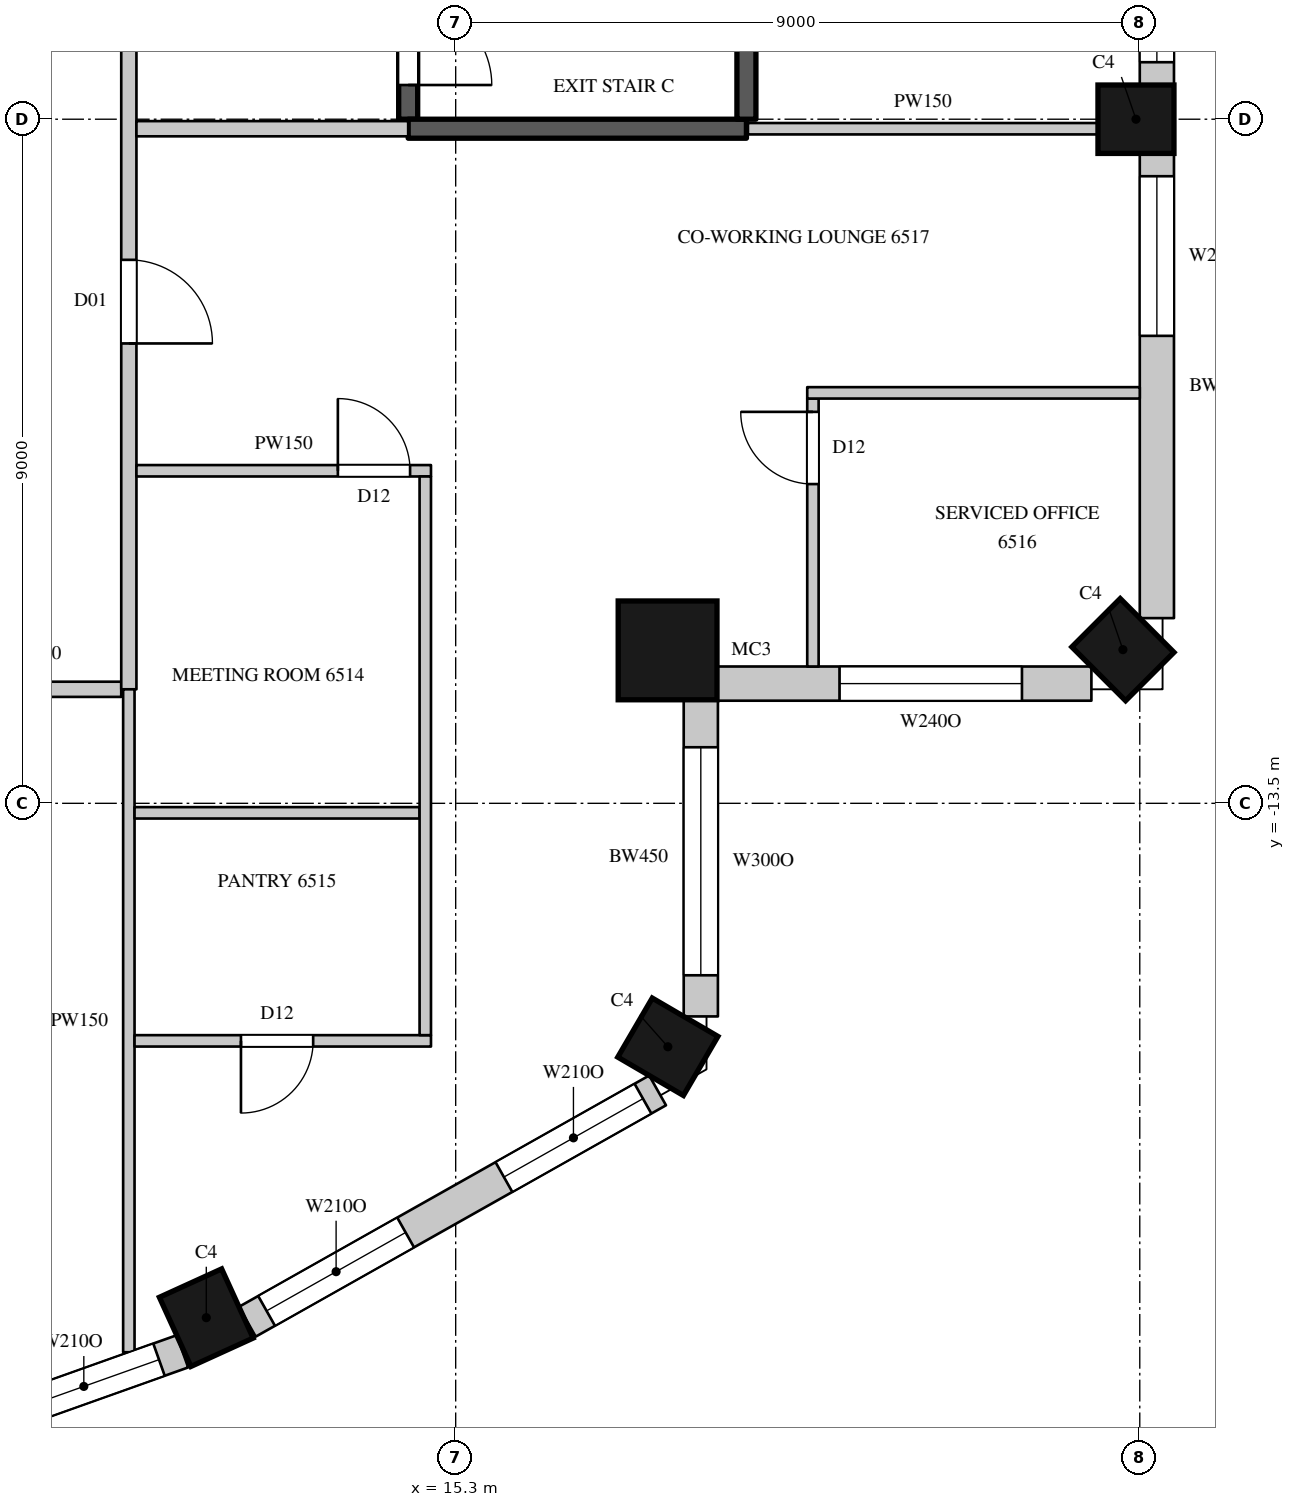
"""IFC4 building model, lengths in metres.
Left out: names, types, materials, properties, quantities, classifications, styles, units other than length and angle.
Written with IfcOpenShell. Run it as: python <this file> out.ifc"""

import sys

from ifc_helpers import new_model, si_unit, direction, frame, frame_2d, origin, origin_2d, place, context, subcontext, project, spatial, rectangle, circle, extrude, element, fill, save


model = new_model("IFC4")
c1 = context("Model", 3, precision=1e-05, world=origin(), true_north=direction((0.0, 1.0)))
c2 = subcontext(c1, "Body", "Model", "MODEL_VIEW")
j1 = project(units=[si_unit("LENGTHUNIT", "METRE"), si_unit("PLANEANGLEUNIT", "RADIAN")], contexts=[c1])
p1 = place(None, origin())
s1 = spatial("IfcSite", under=j1, at=p1, CompositionType="ELEMENT")
p2 = place(p1, origin())
s2 = spatial("IfcBuilding", under=s1, at=p2, CompositionType="ELEMENT")
p3 = place(p2, frame((0.0, 0.0, 288.5)))
s3 = spatial("IfcBuildingStorey", under=s2, at=p3, CompositionType="ELEMENT", Elevation=288.5)
for number, where, z_axis, x_axis in (
    (1, (12.019, -20.267, 0.0), (0.0, 0.0, 1.0), (0.91, 0.415, 0.0)),
    (2, (18.091, -16.703, 0.0), (0.0, 0.0, 1.0), (0.504, 0.863, 0.0)),
):
    element("IfcColumn", number, at=place(p3, frame(where, z_axis=z_axis, x_axis=x_axis)), inside=s3, PredefinedType="COLUMN", context=c2, shape_type="SweptSolid", body=[
        extrude(rectangle(XDim=0.9, YDim=1.0, at=origin_2d()), origin(), (0.0, 0.0, 1.0), 4.1),
    ])
p4 = place(p3, frame((18.088, -11.488, 0.0), z_axis=(0.0, 0.0, 1.0), x_axis=(1.0, 0.0, 0.0)))
e3 = element("IfcColumn", 3, at=p4, inside=s3, PredefinedType="COLUMN", context=c2, shape_type="SweptSolid", body=[
    extrude(circle(Radius=0.65, at=origin_2d()), origin(), (0.0, 0.0, 1.0), 4.1),
])
for number, where, z_axis, x_axis in (
    (4, (24.078, -11.478, 0.0), (0.0, 0.0, 1.0), (0.707, 0.707, 0.0)),
    (5, (24.25, -4.5, 0.0), (0.0, 0.0, 1.0), (0.0, 1.0, 0.0)),
):
    element("IfcColumn", number, at=place(p3, frame(where, z_axis=z_axis, x_axis=x_axis)), inside=s3, PredefinedType="COLUMN", context=c2, shape_type="SweptSolid", body=[
        extrude(rectangle(XDim=0.9, YDim=1.0, at=origin_2d()), origin(), (0.0, 0.0, 1.0), 4.1),
    ])
p5 = place(p3, frame((5.665, -22.859, 0.0), z_axis=(0.0, 0.0, 1.0), x_axis=(0.942108340262, 0.335308626803, 0.0)))
e6 = element("IfcWall", 6, at=p5, inside=s3, PredefinedType="SOLIDWALL", context=c2, shape_type="SweptSolid", body=[
    extrude(rectangle(XDim=6.412, YDim=0.45, at=frame_2d((3.206, 0.0))), origin(), (0.0, 0.0, 1.0), 3.8),
])
p6 = place(p5, frame((0.327, 0.0, 1.05)))
e7 = element("IfcOpeningElement", 7, at=p6, cuts=e6, PredefinedType="OPENING", context=c2, shape_type="SweptSolid", body=[
    extrude(rectangle(XDim=2.1, YDim=2.4, at=frame_2d((1.05, 1.2))), frame((0.0, 0.235, 0.0), z_axis=(0.0, -1.0, 0.0), x_axis=(1.0, 0.0, 0.0)), (0.0, 0.0, 1.0), 0.47),
])
p7 = place(p5, frame((3.985, 0.0, 1.05)))
e8 = element("IfcOpeningElement", 8, at=p7, cuts=e6, PredefinedType="OPENING", context=c2, shape_type="SweptSolid", body=[
    extrude(rectangle(XDim=2.1, YDim=2.4, at=frame_2d((1.05, 1.2))), frame((0.0, 0.235, 0.0), z_axis=(0.0, -1.0, 0.0), x_axis=(1.0, 0.0, 0.0)), (0.0, 0.0, 1.0), 0.47),
])
p8 = place(p3, frame((12.559, -20.32, 0.0), z_axis=(0.0, 0.0, 1.0), x_axis=(0.871065783524, 0.491166367714, 0.0)))
e9 = element("IfcWall", 9, at=p8, inside=s3, PredefinedType="SOLIDWALL", context=c2, shape_type="SweptSolid", body=[
    extrude(rectangle(XDim=6.196, YDim=0.45, at=frame_2d((3.098, 0.0))), origin(), (0.0, 0.0, 1.0), 3.8),
])
p9 = place(p8, frame((0.291, 0.0, 1.05)))
e10 = element("IfcOpeningElement", 10, at=p9, cuts=e9, PredefinedType="OPENING", context=c2, shape_type="SweptSolid", body=[
    extrude(rectangle(XDim=2.1, YDim=2.4, at=frame_2d((1.05, 1.2))), frame((0.0, 0.235, 0.0), z_axis=(0.0, -1.0, 0.0), x_axis=(1.0, 0.0, 0.0)), (0.0, 0.0, 1.0), 0.47),
])
p10 = place(p8, frame((3.875, 0.0, 1.05)))
e11 = element("IfcOpeningElement", 11, at=p10, cuts=e9, PredefinedType="OPENING", context=c2, shape_type="SweptSolid", body=[
    extrude(rectangle(XDim=2.1, YDim=2.4, at=frame_2d((1.05, 1.2))), frame((0.0, 0.235, 0.0), z_axis=(0.0, -1.0, 0.0), x_axis=(1.0, 0.0, 0.0)), (0.0, 0.0, 1.0), 0.47),
])
p11 = place(p3, frame((18.525, -16.304, 0.0), z_axis=(0.0, 0.0, 1.0), x_axis=(0.0, 1.0, 0.0)))
e12 = element("IfcWall", 12, at=p11, inside=s3, PredefinedType="SOLIDWALL", context=c2, shape_type="SweptSolid", body=[
    extrude(rectangle(XDim=4.202, YDim=0.45, at=frame_2d((2.101, 0.0))), origin(), (0.0, 0.0, 1.0), 3.8),
])
p12 = place(p11, frame((0.541, 0.0, 1.05)))
e13 = element("IfcOpeningElement", 13, at=p12, cuts=e12, PredefinedType="OPENING", context=c2, shape_type="SweptSolid", body=[
    extrude(rectangle(XDim=3.0, YDim=2.4, at=frame_2d((1.5, 1.2))), frame((0.0, 0.235, 0.0), z_axis=(0.0, -1.0, 0.0), x_axis=(1.0, 0.0, 0.0)), (0.0, 0.0, 1.0), 0.47),
])
p13 = place(p3, frame((18.701, -11.925, 0.0), z_axis=(0.0, 0.0, 1.0), x_axis=(1.0, 0.0, 0.0)))
e14 = element("IfcWall", 14, at=p13, inside=s3, PredefinedType="SOLIDWALL", context=c2, shape_type="SweptSolid", body=[
    extrude(rectangle(XDim=4.962, YDim=0.45, at=frame_2d((2.481, 0.0))), origin(), (0.0, 0.0, 1.0), 3.8),
])
p14 = place(p13, frame((1.648, 0.0, 1.05)))
e15 = element("IfcOpeningElement", 15, at=p14, cuts=e14, PredefinedType="OPENING", context=c2, shape_type="SweptSolid", body=[
    extrude(rectangle(XDim=2.4, YDim=2.4, at=frame_2d((1.2, 1.2))), frame((0.0, 0.235, 0.0), z_axis=(0.0, -1.0, 0.0), x_axis=(1.0, 0.0, 0.0)), (0.0, 0.0, 1.0), 0.47),
])
p15 = place(p3, frame((24.525, -11.064, 0.0), z_axis=(0.0, 0.0, 1.0), x_axis=(0.0, 1.0, 0.0)))
e16 = element("IfcWall", 16, at=p15, inside=s3, PredefinedType="SOLIDWALL", context=c2, shape_type="SweptSolid", body=[
    extrude(rectangle(XDim=6.114, YDim=0.45, at=frame_2d((3.057, 0.0))), origin(), (0.0, 0.0, 1.0), 3.8),
])
p16 = place(p15, frame((3.714, 0.0, 1.05)))
e17 = element("IfcOpeningElement", 17, at=p16, cuts=e16, PredefinedType="OPENING", context=c2, shape_type="SweptSolid", body=[
    extrude(rectangle(XDim=2.1, YDim=2.4, at=frame_2d((1.05, 1.2))), frame((0.0, 0.235, 0.0), z_axis=(0.0, -1.0, 0.0), x_axis=(1.0, 0.0, 0.0)), (0.0, 0.0, 1.0), 0.47),
])
p17 = place(p3, frame((24.525, -4.05, 0.0), z_axis=(0.0, 0.0, 1.0), x_axis=(0.0, 1.0, 0.0)))
e18 = element("IfcWall", 18, at=p17, inside=s3, PredefinedType="SOLIDWALL", context=c2, shape_type="SweptSolid", body=[
    extrude(rectangle(XDim=8.1, YDim=0.45, at=frame_2d((4.05, 0.0))), origin(), (0.0, 0.0, 1.0), 3.8),
])
p18 = place(p17, frame((0.3, 0.0, 1.05)))
e19 = element("IfcOpeningElement", 19, at=p18, cuts=e18, PredefinedType="OPENING", context=c2, shape_type="SweptSolid", body=[
    extrude(rectangle(XDim=3.0, YDim=2.4, at=frame_2d((1.5, 1.2))), frame((0.0, 0.235, 0.0), z_axis=(0.0, -1.0, 0.0), x_axis=(1.0, 0.0, 0.0)), (0.0, 0.0, 1.0), 0.47),
])
p19 = place(p17, frame((4.8, 0.0, 1.05)))
e20 = element("IfcOpeningElement", 20, at=p19, cuts=e18, PredefinedType="OPENING", context=c2, shape_type="SweptSolid", body=[
    extrude(rectangle(XDim=3.0, YDim=2.4, at=frame_2d((1.5, 1.2))), frame((0.0, 0.235, 0.0), z_axis=(0.0, -1.0, 0.0), x_axis=(1.0, 0.0, 0.0)), (0.0, 0.0, 1.0), 0.47),
])
p20 = place(p3, frame((-10.9, -12.0, 0.0), z_axis=(0.0, 0.0, 1.0), x_axis=(1.0, 0.0, 0.0)))
e21 = element("IfcWall", 21, at=p20, inside=s3, PredefinedType="PARTITIONING", context=c2, shape_type="SweptSolid", body=[
    extrude(rectangle(XDim=21.8, YDim=0.2, at=frame_2d((10.9, 0.0))), origin(), (0.0, 0.0, 1.0), 3.8),
])
p21 = place(p20, frame((1.1, 0.0, 0.0)))
e22 = element("IfcOpeningElement", 22, at=p21, cuts=e21, PredefinedType="OPENING", context=c2, shape_type="SweptSolid", body=[
    extrude(rectangle(XDim=0.9, YDim=2.2, at=frame_2d((0.45, 1.1))), frame((0.0, 0.11, 0.0), z_axis=(0.0, -1.0, 0.0), x_axis=(1.0, 0.0, 0.0)), (0.0, 0.0, 1.0), 0.22),
])
p22 = place(p20, frame((4.9, 0.0, 0.0)))
e23 = element("IfcOpeningElement", 23, at=p22, cuts=e21, PredefinedType="OPENING", context=c2, shape_type="SweptSolid", body=[
    extrude(rectangle(XDim=0.9, YDim=2.2, at=frame_2d((0.45, 1.1))), frame((0.0, 0.11, 0.0), z_axis=(0.0, -1.0, 0.0), x_axis=(1.0, 0.0, 0.0)), (0.0, 0.0, 1.0), 0.22),
])
p23 = place(p20, frame((7.0, 0.0, 0.0)))
e24 = element("IfcOpeningElement", 24, at=p23, cuts=e21, PredefinedType="OPENING", context=c2, shape_type="SweptSolid", body=[
    extrude(rectangle(XDim=0.9, YDim=2.2, at=frame_2d((0.45, 1.1))), frame((0.0, 0.11, 0.0), z_axis=(0.0, -1.0, 0.0), x_axis=(1.0, 0.0, 0.0)), (0.0, 0.0, 1.0), 0.22),
])
p24 = place(p20, frame((9.95, 0.0, 0.0)))
e25 = element("IfcOpeningElement", 25, at=p24, cuts=e21, PredefinedType="OPENING", context=c2, shape_type="SweptSolid", body=[
    extrude(rectangle(XDim=1.1, YDim=2.4, at=frame_2d((0.55, 1.2))), frame((0.0, 0.11, 0.0), z_axis=(0.0, -1.0, 0.0), x_axis=(1.0, 0.0, 0.0)), (0.0, 0.0, 1.0), 0.22),
])
p25 = place(p3, frame((11.0, -12.0, 0.0), z_axis=(0.0, 0.0, 1.0), x_axis=(0.0, 1.0, 0.0)))
e26 = element("IfcWall", 26, at=p25, inside=s3, PredefinedType="PARTITIONING", context=c2, shape_type="SweptSolid", body=[
    extrude(rectangle(XDim=24.1, YDim=0.2, at=frame_2d((12.05, 0.0))), origin(), (0.0, 0.0, 1.0), 3.8),
])
p26 = place(p25, frame((9.85, 0.0, 0.0)))
e27 = element("IfcOpeningElement", 27, at=p26, cuts=e26, PredefinedType="OPENING", context=c2, shape_type="SweptSolid", body=[
    extrude(rectangle(XDim=1.5, YDim=2.4, at=frame_2d((0.75, 1.2))), frame((0.0, 0.11, 0.0), z_axis=(0.0, -1.0, 0.0), x_axis=(1.0, 0.0, 0.0)), (0.0, 0.0, 1.0), 0.22),
])
p27 = place(p25, frame((4.55, 0.0, 0.0)))
e28 = element("IfcOpeningElement", 28, at=p27, cuts=e26, PredefinedType="OPENING", context=c2, shape_type="SweptSolid", body=[
    extrude(rectangle(XDim=1.1, YDim=2.4, at=frame_2d((0.55, 1.2))), frame((0.0, 0.11, 0.0), z_axis=(0.0, -1.0, 0.0), x_axis=(1.0, 0.0, 0.0)), (0.0, 0.0, 1.0), 0.22),
])
p28 = place(p3, frame((11.1, -4.625, 0.0), z_axis=(0.0, 0.0, 1.0), x_axis=(1.0, 0.0, 0.0)))
e29 = element("IfcWall", 29, at=p28, inside=s3, PredefinedType="PARTITIONING", context=c2, shape_type="SweptSolid", body=[
    extrude(rectangle(XDim=3.575, YDim=0.2, at=frame_2d((1.788, 0.0))), origin(), (0.0, 0.0, 1.0), 3.8),
])
p29 = place(p3, frame((11.0, -20.721, 0.0), z_axis=(0.0, 0.0, 1.0), x_axis=(0.0, 1.0, 0.0)))
e30 = element("IfcWall", 30, at=p29, inside=s3, PredefinedType="PARTITIONING", context=c2, shape_type="SweptSolid", body=[
    extrude(rectangle(XDim=8.721, YDim=0.15, at=frame_2d((4.361, 0.0))), origin(), (0.0, 0.0, 1.0), 3.8),
])
p30 = place(p3, frame((11.075, -16.625, 0.0), z_axis=(0.0, 0.0, 1.0), x_axis=(1.0, 0.0, 0.0)))
e31 = element("IfcWall", 31, at=p30, inside=s3, PredefinedType="PARTITIONING", context=c2, shape_type="SweptSolid", body=[
    extrude(rectangle(XDim=3.9, YDim=0.15, at=frame_2d((1.95, 0.0))), origin(), (0.0, 0.0, 1.0), 3.8),
])
p31 = place(p30, frame((1.4, 0.0, 0.0)))
e32 = element("IfcOpeningElement", 32, at=p31, cuts=e31, PredefinedType="OPENING", context=c2, shape_type="SweptSolid", body=[
    extrude(rectangle(XDim=0.95, YDim=2.2, at=frame_2d((0.475, 1.1))), frame((0.0, 0.085, 0.0), z_axis=(0.0, -1.0, 0.0), x_axis=(1.0, 0.0, 0.0)), (0.0, 0.0, 1.0), 0.17),
])
p32 = place(p3, frame((11.075, -13.625, 0.0), z_axis=(0.0, 0.0, 1.0), x_axis=(1.0, 0.0, 0.0)))
e33 = element("IfcWall", 33, at=p32, inside=s3, PredefinedType="PARTITIONING", context=c2, shape_type="SweptSolid", body=[
    extrude(rectangle(XDim=3.75, YDim=0.15, at=frame_2d((1.875, 0.0))), origin(), (0.0, 0.0, 1.0), 3.8),
])
p33 = place(p3, frame((11.1, -9.125, 0.0), z_axis=(0.0, 0.0, 1.0), x_axis=(1.0, 0.0, 0.0)))
e34 = element("IfcWall", 34, at=p33, inside=s3, PredefinedType="PARTITIONING", context=c2, shape_type="SweptSolid", body=[
    extrude(rectangle(XDim=3.875, YDim=0.15, at=frame_2d((1.938, 0.0))), origin(), (0.0, 0.0, 1.0), 3.8),
])
p34 = place(p33, frame((2.65, 0.0, 0.0)))
e35 = element("IfcOpeningElement", 35, at=p34, cuts=e34, PredefinedType="OPENING", context=c2, shape_type="SweptSolid", body=[
    extrude(rectangle(XDim=0.95, YDim=2.2, at=frame_2d((0.475, 1.1))), frame((0.0, 0.085, 0.0), z_axis=(0.0, -1.0, 0.0), x_axis=(1.0, 0.0, 0.0)), (0.0, 0.0, 1.0), 0.17),
])
p35 = place(p3, frame((14.9, -16.55, 0.0), z_axis=(0.0, 0.0, 1.0), x_axis=(0.0, 1.0, 0.0)))
e36 = element("IfcWall", 36, at=p35, inside=s3, PredefinedType="PARTITIONING", context=c2, shape_type="SweptSolid", body=[
    extrude(rectangle(XDim=7.35, YDim=0.15, at=frame_2d((3.675, 0.0))), origin(), (0.0, 0.0, 1.0), 3.8),
])
p36 = place(p3, frame((19.145, -4.625, 0.0), z_axis=(0.0, 0.0, 1.0), x_axis=(1.0, 0.0, 0.0)))
e37 = element("IfcWall", 37, at=p36, inside=s3, PredefinedType="PARTITIONING", context=c2, shape_type="SweptSolid", body=[
    extrude(rectangle(XDim=4.605, YDim=0.15, at=frame_2d((2.302, 0.0))), origin(), (0.0, 0.0, 1.0), 3.8),
])
p37 = place(p3, frame((20.0, -11.7, 0.0), z_axis=(0.0, 0.0, 1.0), x_axis=(0.0, 1.0, 0.0)))
e38 = element("IfcWall", 38, at=p37, inside=s3, PredefinedType="PARTITIONING", context=c2, shape_type="SweptSolid", body=[
    extrude(rectangle(XDim=3.525, YDim=0.15, at=frame_2d((1.762, 0.0))), origin(), (0.0, 0.0, 1.0), 3.8),
])
p38 = place(p37, frame((2.4, 0.0, 0.0)))
e39 = element("IfcOpeningElement", 39, at=p38, cuts=e38, PredefinedType="OPENING", context=c2, shape_type="SweptSolid", body=[
    extrude(rectangle(XDim=0.95, YDim=2.2, at=frame_2d((0.475, 1.1))), frame((0.0, 0.085, 0.0), z_axis=(0.0, -1.0, 0.0), x_axis=(1.0, 0.0, 0.0)), (0.0, 0.0, 1.0), 0.17),
])
p39 = place(p3, frame((19.925, -8.1, 0.0), z_axis=(0.0, 0.0, 1.0), x_axis=(1.0, 0.0, 0.0)))
e40 = element("IfcWall", 40, at=p39, inside=s3, PredefinedType="PARTITIONING", context=c2, shape_type="SweptSolid", body=[
    extrude(rectangle(XDim=4.375, YDim=0.15, at=frame_2d((2.188, 0.0))), origin(), (0.0, 0.0, 1.0), 3.15),
])
p40 = place(p3, frame((14.675, -4.5, 0.0), z_axis=(0.0, 0.0, 1.0), x_axis=(0.0, 1.0, 0.0)))
e41 = element("IfcWall", 41, at=p40, inside=s3, PredefinedType="SHEAR", context=c2, shape_type="SweptSolid", body=[
    extrude(rectangle(XDim=9.0, YDim=0.25, at=frame_2d((4.5, 0.0))), origin(), (0.0, 0.0, 1.0), 3.8),
])
p41 = place(p40, frame((0.45, 0.0, 0.0)))
e42 = element("IfcOpeningElement", 42, at=p41, cuts=e41, PredefinedType="OPENING", context=c2, shape_type="SweptSolid", body=[
    extrude(rectangle(XDim=1.1, YDim=2.2, at=frame_2d((0.55, 1.1))), frame((0.0, 0.135, 0.0), z_axis=(0.0, -1.0, 0.0), x_axis=(1.0, 0.0, 0.0)), (0.0, 0.0, 1.0), 0.27),
])
p42 = place(p3, frame((14.675, -4.625, 0.0), z_axis=(0.0, 0.0, 1.0), x_axis=(1.0, 0.0, 0.0)))
e43 = element("IfcWall", 43, at=p42, inside=s3, PredefinedType="SHEAR", context=c2, shape_type="SweptSolid", body=[
    extrude(rectangle(XDim=4.45, YDim=0.25, at=frame_2d((2.225, 0.0))), origin(), (0.0, 0.0, 1.0), 3.8),
])
p43 = place(p3, frame((19.125, -4.5, 0.0), z_axis=(0.0, 0.0, 1.0), x_axis=(0.0, 1.0, 0.0)))
e44 = element("IfcWall", 44, at=p43, inside=s3, PredefinedType="SHEAR", context=c2, shape_type="SweptSolid", body=[
    extrude(rectangle(XDim=9.0, YDim=0.25, at=frame_2d((4.5, 0.0))), origin(), (0.0, 0.0, 1.0), 3.8),
])
p44 = place(p7, origin())
e45 = element("IfcWindow", 45, at=p44, inside=s3, PartitioningType="SINGLE_PANEL", PredefinedType="WINDOW", context=c2, shape_type="SweptSolid", body=[
    extrude(rectangle(XDim=2.1, YDim=2.4, at=frame_2d((1.05, 1.2))), frame((0.0, 0.135, 0.0), z_axis=(0.0, -1.0, 0.0), x_axis=(1.0, 0.0, 0.0)), (0.0, 0.0, 1.0), 0.06),
])
fill(e8, e45)
p45 = place(p9, origin())
e46 = element("IfcWindow", 46, at=p45, inside=s3, PartitioningType="SINGLE_PANEL", PredefinedType="WINDOW", context=c2, shape_type="SweptSolid", body=[
    extrude(rectangle(XDim=2.1, YDim=2.4, at=frame_2d((1.05, 1.2))), frame((0.0, 0.135, 0.0), z_axis=(0.0, -1.0, 0.0), x_axis=(1.0, 0.0, 0.0)), (0.0, 0.0, 1.0), 0.06),
])
fill(e10, e46)
p46 = place(p10, origin())
e47 = element("IfcWindow", 47, at=p46, inside=s3, PartitioningType="SINGLE_PANEL", PredefinedType="WINDOW", context=c2, shape_type="SweptSolid", body=[
    extrude(rectangle(XDim=2.1, YDim=2.4, at=frame_2d((1.05, 1.2))), frame((0.0, 0.135, 0.0), z_axis=(0.0, -1.0, 0.0), x_axis=(1.0, 0.0, 0.0)), (0.0, 0.0, 1.0), 0.06),
])
fill(e11, e47)
p47 = place(p12, origin())
e48 = element("IfcWindow", 48, at=p47, inside=s3, PartitioningType="SINGLE_PANEL", PredefinedType="WINDOW", context=c2, shape_type="SweptSolid", body=[
    extrude(rectangle(XDim=3.0, YDim=2.4, at=frame_2d((1.5, 1.2))), frame((0.0, 0.135, 0.0), z_axis=(0.0, -1.0, 0.0), x_axis=(1.0, 0.0, 0.0)), (0.0, 0.0, 1.0), 0.06),
])
fill(e13, e48)
p48 = place(p16, origin())
e49 = element("IfcWindow", 49, at=p48, inside=s3, PartitioningType="SINGLE_PANEL", PredefinedType="WINDOW", context=c2, shape_type="SweptSolid", body=[
    extrude(rectangle(XDim=2.1, YDim=2.4, at=frame_2d((1.05, 1.2))), frame((0.0, 0.135, 0.0), z_axis=(0.0, -1.0, 0.0), x_axis=(1.0, 0.0, 0.0)), (0.0, 0.0, 1.0), 0.06),
])
fill(e17, e49)
p49 = place(p18, origin())
e50 = element("IfcWindow", 50, at=p49, inside=s3, PartitioningType="SINGLE_PANEL", PredefinedType="WINDOW", context=c2, shape_type="SweptSolid", body=[
    extrude(rectangle(XDim=3.0, YDim=2.4, at=frame_2d((1.5, 1.2))), frame((0.0, 0.135, 0.0), z_axis=(0.0, -1.0, 0.0), x_axis=(1.0, 0.0, 0.0)), (0.0, 0.0, 1.0), 0.06),
])
fill(e19, e50)
p50 = place(p27, origin())
e51 = element("IfcDoor", 51, at=p50, inside=s3, OperationType="SINGLE_SWING_RIGHT", PredefinedType="DOOR", context=c2, shape_type="SweptSolid", body=[
    extrude(rectangle(XDim=1.1, YDim=2.4, at=frame_2d((0.55, 1.2))), frame((0.0, 0.025, 0.0), z_axis=(0.0, -1.0, 0.0), x_axis=(1.0, 0.0, 0.0)), (0.0, 0.0, 1.0), 0.05),
])
fill(e28, e51)
p51 = place(p34, origin())
e52 = element("IfcDoor", 52, at=p51, inside=s3, OperationType="SINGLE_SWING_LEFT", PredefinedType="DOOR", context=c2, shape_type="SweptSolid", body=[
    extrude(rectangle(XDim=0.95, YDim=2.2, at=frame_2d((0.475, 1.1))), frame((0.0, 0.025, 0.0), z_axis=(0.0, -1.0, 0.0), x_axis=(1.0, 0.0, 0.0)), (0.0, 0.0, 1.0), 0.05),
])
fill(e35, e52)
p52 = place(p31, origin())
e53 = element("IfcDoor", 53, at=p52, inside=s3, OperationType="SINGLE_SWING_RIGHT", PredefinedType="DOOR", context=c2, shape_type="SweptSolid", body=[
    extrude(rectangle(XDim=0.95, YDim=2.2, at=frame_2d((0.475, 1.1))), frame((0.0, 0.025, 0.0), z_axis=(0.0, -1.0, 0.0), x_axis=(1.0, 0.0, 0.0)), (0.0, 0.0, 1.0), 0.05),
])
fill(e32, e53)
p53 = place(p38, origin())
e54 = element("IfcDoor", 54, at=p53, inside=s3, OperationType="SINGLE_SWING_RIGHT", PredefinedType="DOOR", context=c2, shape_type="SweptSolid", body=[
    extrude(rectangle(XDim=0.95, YDim=2.2, at=frame_2d((0.475, 1.1))), frame((0.0, 0.025, 0.0), z_axis=(0.0, -1.0, 0.0), x_axis=(1.0, 0.0, 0.0)), (0.0, 0.0, 1.0), 0.05),
])
fill(e39, e54)
p54 = place(p41, origin())
e55 = element("IfcDoor", 55, at=p54, inside=s3, OperationType="SINGLE_SWING_RIGHT", PredefinedType="DOOR", context=c2, shape_type="SweptSolid", body=[
    extrude(rectangle(XDim=1.1, YDim=2.2, at=frame_2d((0.55, 1.1))), frame((0.0, 0.025, 0.0), z_axis=(0.0, -1.0, 0.0), x_axis=(1.0, 0.0, 0.0)), (0.0, 0.0, 1.0), 0.05),
])
fill(e42, e55)
p55 = place(p14, origin())
e56 = element("IfcWindow", 56, at=p55, inside=s3, PartitioningType="SINGLE_PANEL", PredefinedType="WINDOW", context=c2, shape_type="SweptSolid", body=[
    extrude(rectangle(XDim=2.4, YDim=2.4, at=frame_2d((1.2, 1.2))), frame((0.0, 0.135, 0.0), z_axis=(0.0, -1.0, 0.0), x_axis=(1.0, 0.0, 0.0)), (0.0, 0.0, 1.0), 0.06),
])
fill(e15, e56)
save(model, sys.argv[1])
